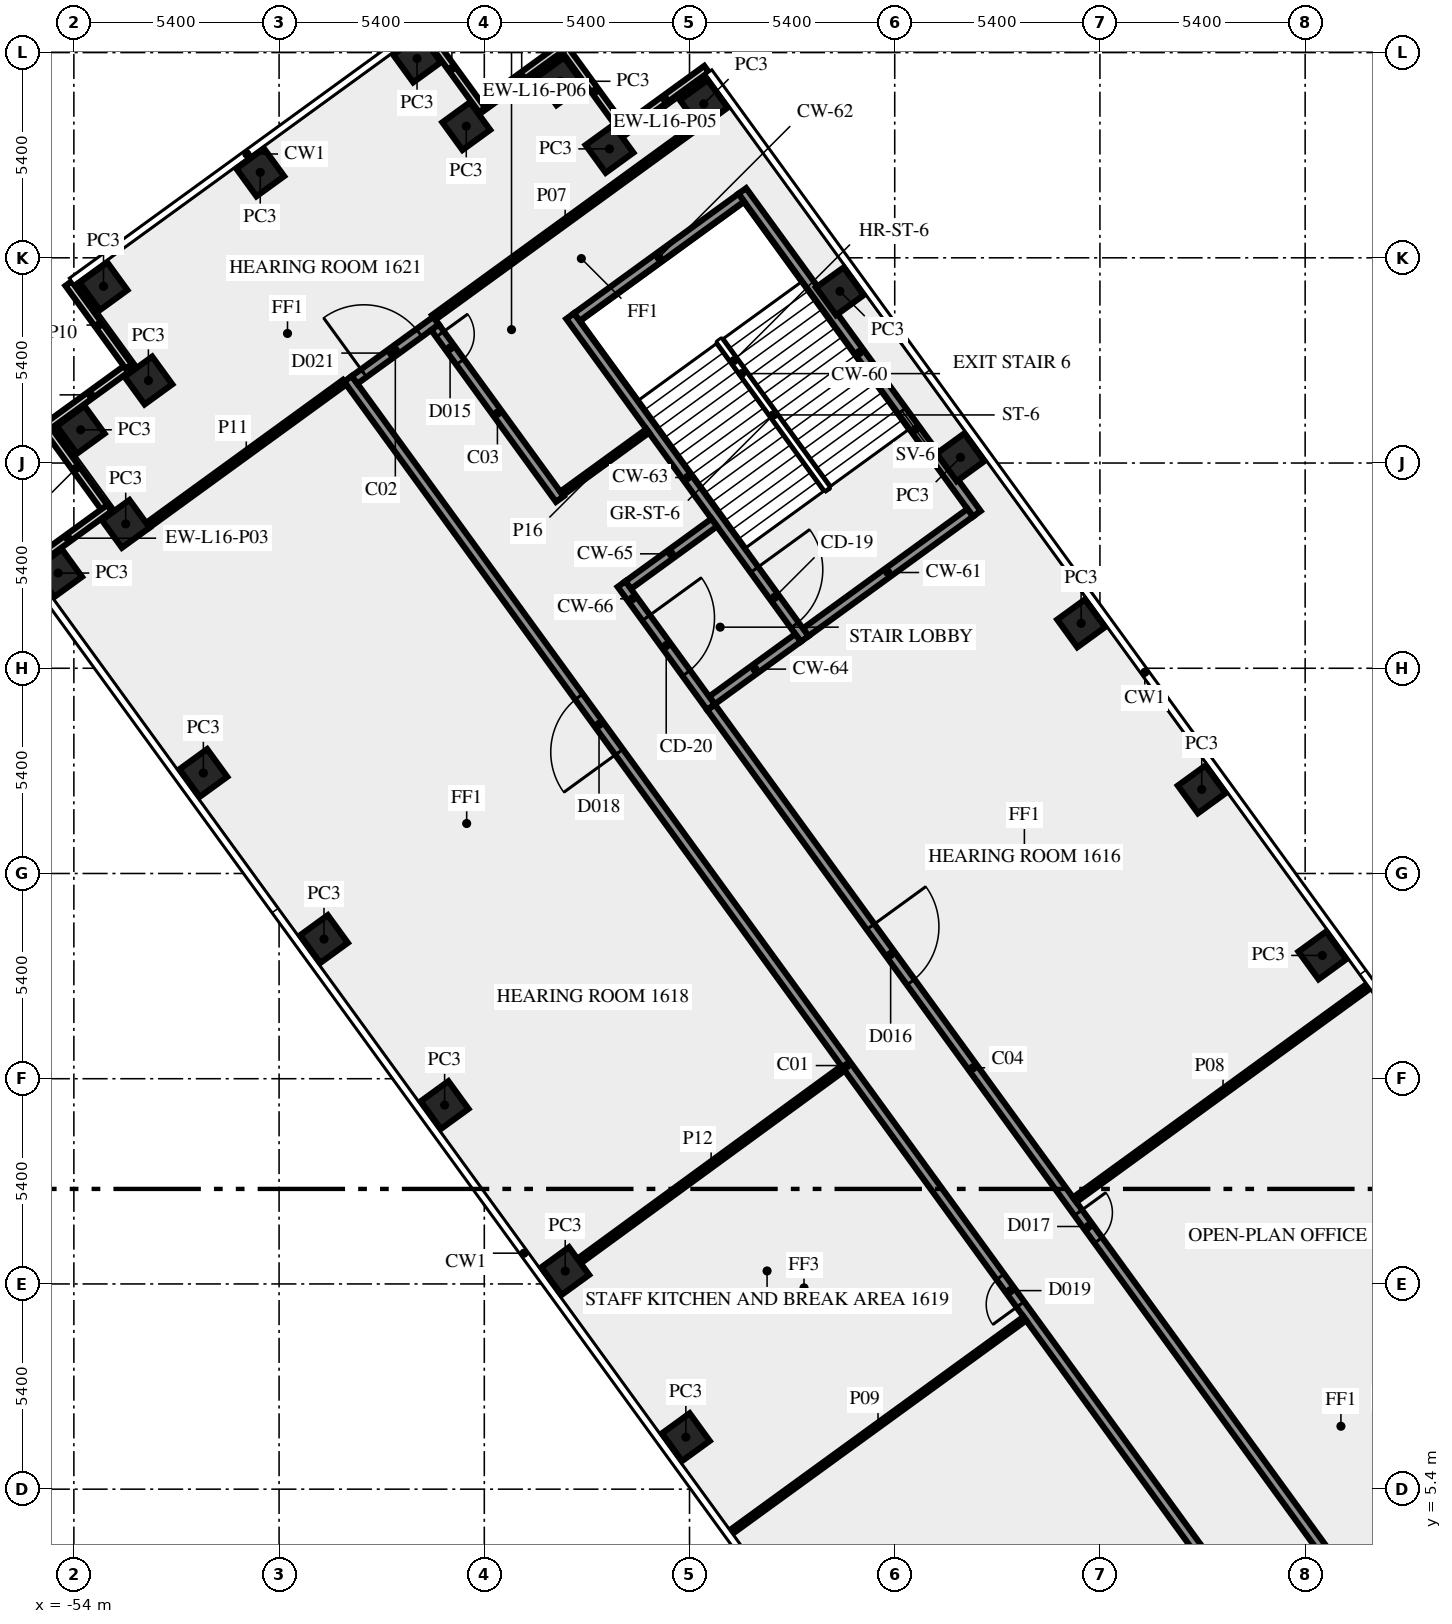
"""IFC4 building model, lengths in metres.
Left out: names, types, materials, properties, quantities, classifications, styles, units other than length and angle.
Written with IfcOpenShell. Run it as: python <this file> out.ifc"""

import sys

from ifc_helpers import new_model, si_unit, direction, frame, frame_2d, origin, origin_2d, place, context, subcontext, project, spatial, rectangle, extrude, element, fill, save


model = new_model("IFC4")
c1 = context("Model", 3, precision=1e-05, world=origin(), true_north=direction((0.0, 1.0)))
c2 = subcontext(c1, "Body", "Model", "MODEL_VIEW")
j1 = project(units=[si_unit("LENGTHUNIT", "METRE"), si_unit("PLANEANGLEUNIT", "RADIAN")], contexts=[c1])
p1 = place(None, origin())
s1 = spatial("IfcSite", under=j1, at=p1, CompositionType="ELEMENT")
p2 = place(p1, origin())
s2 = spatial("IfcBuilding", under=s1, at=p2, CompositionType="ELEMENT")
p3 = place(p2, frame((0.0, 0.0, 71.0)))
s3 = spatial("IfcBuildingStorey", under=s2, at=p3, CompositionType="ELEMENT", Elevation=71.0)
for number, where, z_axis, x_axis in (
    (1, (-21.147, 19.444, 0.0), (0.0, 0.0, 1.0), (-0.588, 0.809, 0.0)),
    (2, (-24.321, 23.812, 0.0), (0.0, 0.0, 1.0), (-0.588, 0.809, 0.0)),
    (3, (-27.495, 28.181, 0.0), (0.0, 0.0, 1.0), (-0.588, 0.809, 0.0)),
    (4, (-30.669, 32.55, 0.0), (0.0, 0.0, 1.0), (-0.588, 0.809, 0.0)),
    (5, (-33.843, 36.919, 0.0), (0.0, 0.0, 1.0), (-0.588, 0.809, 0.0)),
    (6, (-37.425, 41.85, 0.0), (0.0, 0.0, 1.0), (-0.588, 0.809, 0.0)),
    (7, (-39.906, 40.666, 0.0), (0.0, 0.0, 1.0), (-0.588, 0.809, 0.0)),
    (8, (-41.2, 42.445, 0.0), (0.0, 0.0, 1.0), (-0.588, 0.809, 0.0)),
    (9, (-43.675, 41.265, 0.0), (0.0, 0.0, 1.0), (-0.809, -0.588, 0.0)),
    (10, (-44.97, 43.045, 0.0), (0.0, 0.0, 1.0), (-0.809, -0.588, 0.0)),
    (11, (-49.096, 40.047, 0.0), (0.0, 0.0, 1.0), (-0.809, -0.588, 0.0)),
    (12, (-53.22, 37.05, 0.0), (0.0, 0.0, 1.0), (0.588, -0.809, 0.0)),
    (13, (-52.039, 34.571, 0.0), (0.0, 0.0, 1.0), (-0.809, -0.588, 0.0)),
    (14, (-53.82, 33.275, 0.0), (0.0, 0.0, 1.0), (0.588, -0.809, 0.0)),
    (15, (-52.636, 30.8, 0.0), (0.0, 0.0, 1.0), (-0.809, -0.588, 0.0)),
    (16, (-54.415, 29.505, 0.0), (0.0, 0.0, 1.0), (0.588, -0.809, 0.0)),
    (17, (-50.592, 24.243, 0.0), (0.0, 0.0, 1.0), (0.588, -0.809, 0.0)),
    (18, (-47.418, 19.875, 0.0), (0.0, 0.0, 1.0), (0.588, -0.809, 0.0)),
    (19, (-44.244, 15.506, 0.0), (0.0, 0.0, 1.0), (0.588, -0.809, 0.0)),
    (20, (-41.07, 11.137, 0.0), (0.0, 0.0, 1.0), (0.588, -0.809, 0.0)),
    (21, (-37.896, 6.769, 0.0), (0.0, 0.0, 1.0), (0.588, -0.809, 0.0)),
):
    element("IfcColumn", number, at=place(p3, frame(where, z_axis=z_axis, x_axis=x_axis)), inside=s3, PredefinedType="COLUMN", context=c2, shape_type="SweptSolid", body=[
        extrude(rectangle(XDim=0.9, YDim=0.9, at=origin_2d()), origin(), (0.0, 0.0, 1.0), 3.65),
    ])
p4 = place(p3, frame((-52.465, 34.987, 0.0), z_axis=(0.0, 0.0, 1.0), x_axis=(-0.809033161865, -0.587762999008, 0.0)))
e22 = element("IfcWall", 22, at=p4, inside=s3, PredefinedType="SOLIDWALL", context=c2, shape_type="SweptSolid", body=[
    extrude(rectangle(XDim=2.7, YDim=0.2, at=frame_2d((1.35, 0.0))), origin(), (0.0, 0.0, 1.0), 3.65),
])
p5 = place(p3, frame((-54.738, 33.351, 0.0), z_axis=(0.0, 0.0, 1.0), x_axis=(0.587779184282, -0.809021403008, 0.0)))
e23 = element("IfcWall", 23, at=p5, inside=s3, PredefinedType="SOLIDWALL", context=c2, shape_type="SweptSolid", body=[
    extrude(rectangle(XDim=2.7, YDim=0.2, at=frame_2d((1.35, 0.0))), origin(), (0.0, 0.0, 1.0), 3.65),
])
for number, where, z_axis, x_axis in (
    (24, (-53.063, 31.216, 0.0), (0.0, 0.0, 1.0), (-0.809, -0.588, 0.0)),
    (25, (-37.353, 42.768, 0.0), (0.0, 0.0, 1.0), (-0.809, -0.588, 0.0)),
):
    element("IfcWall", number, at=place(p3, frame(where, z_axis=z_axis, x_axis=x_axis)), inside=s3, PredefinedType="SOLIDWALL", context=c2, shape_type="SweptSolid", body=[
        extrude(rectangle(XDim=2.7, YDim=0.2, at=frame_2d((1.35, 0.0))), origin(), (0.0, 0.0, 1.0), 3.65),
    ])
p6 = place(p3, frame((-39.488, 41.094, 0.0), z_axis=(0.0, 0.0, 1.0), x_axis=(-0.587806000234, 0.809001919707, 0.0)))
e26 = element("IfcWall", 26, at=p6, inside=s3, PredefinedType="SOLIDWALL", context=c2, shape_type="SweptSolid", body=[
    extrude(rectangle(XDim=2.7, YDim=0.2, at=frame_2d((1.35, 0.0))), origin(), (0.0, 0.0, 1.0), 3.65),
])
for number, where, z_axis, x_axis in (
    (27, (-41.124, 43.366, 0.0), (0.0, 0.0, 1.0), (-0.809, -0.588, 0.0)),
    (28, (-43.259, 41.691, 0.0), (0.0, 0.0, 1.0), (-0.588, 0.809, 0.0)),
    (29, (-54.14, 37.123, 0.0), (0.0, 0.0, 1.0), (0.588, -0.809, 0.0)),
):
    element("IfcWall", number, at=place(p3, frame(where, z_axis=z_axis, x_axis=x_axis)), inside=s3, PredefinedType="SOLIDWALL", context=c2, shape_type="SweptSolid", body=[
        extrude(rectangle(XDim=2.7, YDim=0.2, at=frame_2d((1.35, 0.0))), origin(), (0.0, 0.0, 1.0), 3.65),
    ])
p7 = place(p3, frame((-30.24, 31.064, 0.0), z_axis=(0.0, 0.0, 1.0), x_axis=(-0.587795589702, 0.809009483706, 0.0)))
e30 = element("IfcWall", 30, at=p7, inside=s3, PredefinedType="SHEAR", context=c2, shape_type="SweptSolid", body=[
    extrude(rectangle(XDim=10.5, YDim=0.25, at=frame_2d((5.25, 0.0))), origin(), (0.0, 0.0, 1.0), 3.65),
])
p8 = place(p7, frame((2.15, 0.0, 1.0)))
e31 = element("IfcOpeningElement", 31, at=p8, cuts=e30, PredefinedType="OPENING", context=c2, shape_type="SweptSolid", body=[
    extrude(rectangle(XDim=1.2, YDim=1.2, at=frame_2d((0.6, 0.6))), frame((0.0, 0.135, 0.0), z_axis=(0.0, -1.0, 0.0), x_axis=(1.0, 0.0, 0.0)), (0.0, 0.0, 1.0), 0.27),
])
p9 = place(p3, frame((-30.414, 31.092, 0.0), z_axis=(0.0, 0.0, 1.0), x_axis=(-0.8089984606, -0.587810760999, 0.0)))
e32 = element("IfcWall", 32, at=p9, inside=s3, PredefinedType="SHEAR", context=c2, shape_type="SweptSolid", body=[
    extrude(rectangle(XDim=5.35, YDim=0.25, at=frame_2d((2.675, 0.0))), origin(), (0.0, 0.0, 1.0), 3.65),
])
p10 = place(p3, frame((-36.439, 39.384, 0.0), z_axis=(0.0, 0.0, 1.0), x_axis=(-0.809020161303, -0.587780893365, 0.0)))
e33 = element("IfcWall", 33, at=p10, inside=s3, PredefinedType="SHEAR", context=c2, shape_type="SweptSolid", body=[
    extrude(rectangle(XDim=5.35, YDim=0.25, at=frame_2d((2.675, 0.0))), origin(), (0.0, 0.0, 1.0), 3.65),
])
p11 = place(p3, frame((-40.942, 36.267, 0.0), z_axis=(0.0, 0.0, 1.0), x_axis=(0.587795589702, -0.809009483706, 0.0)))
e34 = element("IfcWall", 34, at=p11, inside=s3, PredefinedType="SHEAR", context=c2, shape_type="SweptSolid", body=[
    extrude(rectangle(XDim=10.5, YDim=0.25, at=frame_2d((5.25, 0.0))), origin(), (0.0, 0.0, 1.0), 3.65),
])
p12 = place(p11, frame((8.25, 0.0, 0.0)))
e35 = element("IfcOpeningElement", 35, at=p12, cuts=e34, PredefinedType="OPENING", context=c2, shape_type="SweptSolid", body=[
    extrude(rectangle(XDim=1.8, YDim=2.1, at=frame_2d((0.9, 1.05))), frame((0.0, 0.135, 0.0), z_axis=(0.0, -1.0, 0.0), x_axis=(1.0, 0.0, 0.0)), (0.0, 0.0, 1.0), 0.27),
])
for number, where, z_axis, x_axis in (
    (36, (-34.945, 27.8, 0.0), (0.0, 0.0, 1.0), (-0.809, -0.588, 0.0)),
    (37, (-37.149, 30.834, 0.0), (0.0, 0.0, 1.0), (-0.809, -0.588, 0.0)),
):
    element("IfcWall", number, at=place(p3, frame(where, z_axis=z_axis, x_axis=x_axis)), inside=s3, PredefinedType="SHEAR", context=c2, shape_type="SweptSolid", body=[
        extrude(rectangle(XDim=2.8, YDim=0.25, at=frame_2d((1.4, 0.0))), origin(), (0.0, 0.0, 1.0), 3.65),
    ])
p13 = place(p3, frame((-39.589, 29.216, 0.0), z_axis=(0.0, 0.0, 1.0), x_axis=(0.587772420479, -0.809026317077, 0.0)))
e38 = element("IfcWall", 38, at=p13, inside=s3, PredefinedType="SHEAR", context=c2, shape_type="SweptSolid", body=[
    extrude(rectangle(XDim=4.0, YDim=0.25, at=frame_2d((2.0, 0.0))), origin(), (0.0, 0.0, 1.0), 3.65),
])
p14 = place(p13, frame((1.1, 0.0, 0.0)))
e39 = element("IfcOpeningElement", 39, at=p14, cuts=e38, PredefinedType="OPENING", context=c2, shape_type="SweptSolid", body=[
    extrude(rectangle(XDim=1.8, YDim=2.1, at=frame_2d((0.9, 1.05))), frame((0.0, 0.135, 0.0), z_axis=(0.0, -1.0, 0.0), x_axis=(1.0, 0.0, 0.0)), (0.0, 0.0, 1.0), 0.27),
])
p15 = place(p3, frame((-20.531, -1.523, 0.0), z_axis=(0.0, 0.0, 1.0), x_axis=(-0.587784593204, 0.809017473231, 0.0)))
e40 = element("IfcWall", 40, at=p15, inside=s3, PredefinedType="SOLIDWALL", context=c2, shape_type="SweptSolid", body=[
    extrude(rectangle(XDim=44.67, YDim=0.25, at=frame_2d((22.335, 0.0))), origin(), (0.0, 0.0, 1.0), 3.65),
])
p16 = place(p15, frame((0.533, 0.0, 0.0)))
e41 = element("IfcOpeningElement", 41, at=p16, cuts=e40, PredefinedType="OPENING", context=c2, shape_type="SweptSolid", body=[
    extrude(rectangle(XDim=0.9, YDim=2.1, at=frame_2d((0.45, 1.05))), frame((0.0, 0.135, 0.0), z_axis=(0.0, -1.0, 0.0), x_axis=(1.0, 0.0, 0.0)), (0.0, 0.0, 1.0), 0.27),
])
p17 = place(p15, frame((32.531, 0.0, 0.0)))
e42 = element("IfcOpeningElement", 42, at=p17, cuts=e40, PredefinedType="OPENING", context=c2, shape_type="SweptSolid", body=[
    extrude(rectangle(XDim=1.8, YDim=2.1, at=frame_2d((0.9, 1.05))), frame((0.0, 0.135, 0.0), z_axis=(0.0, -1.0, 0.0), x_axis=(1.0, 0.0, 0.0)), (0.0, 0.0, 1.0), 0.27),
])
p18 = place(p15, frame((14.566, 0.0, 0.0)))
e43 = element("IfcOpeningElement", 43, at=p18, cuts=e40, PredefinedType="OPENING", context=c2, shape_type="SweptSolid", body=[
    extrude(rectangle(XDim=0.9, YDim=2.1, at=frame_2d((0.45, 1.05))), frame((0.0, 0.135, 0.0), z_axis=(0.0, -1.0, 0.0), x_axis=(1.0, 0.0, 0.0)), (0.0, 0.0, 1.0), 0.27),
])
p19 = place(p3, frame((-46.613, 34.588, 0.0), z_axis=(0.0, 0.0, 1.0), x_axis=(0.808994936898, 0.587815610607, 0.0)))
e44 = element("IfcWall", 44, at=p19, inside=s3, PredefinedType="SOLIDWALL", context=c2, shape_type="SweptSolid", body=[
    extrude(rectangle(XDim=2.65, YDim=0.25, at=frame_2d((1.325, 0.0))), origin(), (0.0, 0.0, 1.0), 3.65),
])
p20 = place(p19, frame((0.299, 0.0, 0.0)))
e45 = element("IfcOpeningElement", 45, at=p20, cuts=e44, PredefinedType="OPENING", context=c2, shape_type="SweptSolid", body=[
    extrude(rectangle(XDim=1.8, YDim=2.1, at=frame_2d((0.9, 1.05))), frame((0.0, 0.135, 0.0), z_axis=(0.0, -1.0, 0.0), x_axis=(1.0, 0.0, 0.0)), (0.0, 0.0, 1.0), 0.27),
])
p21 = place(p3, frame((-44.497, 35.971, 0.0), z_axis=(0.0, 0.0, 1.0), x_axis=(0.587742866856, -0.809047787501, 0.0)))
e46 = element("IfcWall", 46, at=p21, inside=s3, PredefinedType="SOLIDWALL", context=c2, shape_type="SweptSolid", body=[
    extrude(rectangle(XDim=5.586, YDim=0.25, at=frame_2d((2.793, 0.0))), origin(), (0.0, 0.0, 1.0), 3.65),
])
p22 = place(p21, frame((0.224, 0.0, 0.0)))
e47 = element("IfcOpeningElement", 47, at=p22, cuts=e46, PredefinedType="OPENING", context=c2, shape_type="SweptSolid", body=[
    extrude(rectangle(XDim=0.9, YDim=2.1, at=frame_2d((0.45, 1.05))), frame((0.0, 0.135, 0.0), z_axis=(0.0, -1.0, 0.0), x_axis=(1.0, 0.0, 0.0)), (0.0, 0.0, 1.0), 0.27),
])
p23 = place(p3, frame((-37.232, 25.972, 0.0), z_axis=(0.0, 0.0, 1.0), x_axis=(0.587786323093, -0.809016216391, 0.0)))
e48 = element("IfcWall", 48, at=p23, inside=s3, PredefinedType="SOLIDWALL", context=c2, shape_type="SweptSolid", body=[
    extrude(rectangle(XDim=33.493, YDim=0.25, at=frame_2d((16.747, 0.0))), origin(), (0.0, 0.0, 1.0), 3.65),
])
p24 = place(p23, frame((16.435, 0.0, 0.0)))
e49 = element("IfcOpeningElement", 49, at=p24, cuts=e48, PredefinedType="OPENING", context=c2, shape_type="SweptSolid", body=[
    extrude(rectangle(XDim=0.9, YDim=2.1, at=frame_2d((0.45, 1.05))), frame((0.0, 0.135, 0.0), z_axis=(0.0, -1.0, 0.0), x_axis=(1.0, 0.0, 0.0)), (0.0, 0.0, 1.0), 0.27),
])
p25 = place(p23, frame((7.137, 0.0, 0.0)))
e50 = element("IfcOpeningElement", 50, at=p25, cuts=e48, PredefinedType="OPENING", context=c2, shape_type="SweptSolid", body=[
    extrude(rectangle(XDim=1.8, YDim=2.1, at=frame_2d((0.9, 1.05))), frame((0.0, 0.135, 0.0), z_axis=(0.0, -1.0, 0.0), x_axis=(1.0, 0.0, 0.0)), (0.0, 0.0, 1.0), 0.27),
])
p26 = place(p3, frame((-37.614, 41.257, 0.0), z_axis=(0.0, 0.0, 1.0), x_axis=(-0.808991595707, -0.587820208972, 0.0)))
e51 = element("IfcWall", 51, at=p26, inside=s3, PredefinedType="PARTITIONING", context=c2, shape_type="SweptSolid", body=[
    extrude(rectangle(XDim=8.551, YDim=0.15, at=frame_2d((4.275, 0.0))), origin(), (0.0, 0.0, 1.0), 3.65),
])
p27 = place(p3, frame((-19.857, 18.689, 0.0), z_axis=(0.0, 0.0, 1.0), x_axis=(-0.809002920164, -0.587804623294, 0.0)))
e52 = element("IfcWall", 52, at=p27, inside=s3, PredefinedType="PARTITIONING", context=c2, shape_type="SweptSolid", body=[
    extrude(rectangle(XDim=9.651, YDim=0.15, at=frame_2d((4.825, 0.0))), origin(), (0.0, 0.0, 1.0), 2.75),
])
p28 = place(p3, frame((-28.976, 9.888, 0.0), z_axis=(0.0, 0.0, 1.0), x_axis=(-0.808998008689, -0.58781138296, 0.0)))
e53 = element("IfcWall", 53, at=p28, inside=s3, PredefinedType="PARTITIONING", context=c2, shape_type="SweptSolid", body=[
    extrude(rectangle(XDim=9.55, YDim=0.12, at=frame_2d((4.775, 0.0))), origin(), (0.0, 0.0, 1.0), 2.75),
])
p29 = place(p3, frame((-46.877, 34.526, 0.0), z_axis=(0.0, 0.0, 1.0), x_axis=(-0.808993566199, -0.587817497059, 0.0)))
e54 = element("IfcWall", 54, at=p29, inside=s3, PredefinedType="PARTITIONING", context=c2, shape_type="SweptSolid", body=[
    extrude(rectangle(XDim=6.395, YDim=0.15, at=frame_2d((3.197, 0.0))), origin(), (0.0, 0.0, 1.0), 3.65),
])
p30 = place(p3, frame((-40.702, 11.405, 0.0), z_axis=(0.0, 0.0, 1.0), x_axis=(0.807600812808, 0.58972953729, 0.0)))
e55 = element("IfcWall", 55, at=p30, inside=s3, PredefinedType="PARTITIONING", context=c2, shape_type="SweptSolid", body=[
    extrude(rectangle(XDim=8.595, YDim=0.15, at=frame_2d((4.297, 0.0))), origin(), (0.0, 0.0, 1.0), 3.65),
])
p31 = place(p3, frame((-41.166, 31.599, 0.0), z_axis=(0.0, 0.0, 1.0), x_axis=(0.809090262332, 0.587684394381, 0.0)))
e56 = element("IfcWall", 56, at=p31, inside=s3, PredefinedType="PARTITIONING", context=c2, shape_type="SweptSolid", body=[
    extrude(rectangle(XDim=2.801, YDim=0.12, at=frame_2d((1.4, 0.0))), origin(), (0.0, 0.0, 1.0), 3.65),
])
p32 = place(p8, origin())
e57 = element("IfcWindow", 57, at=p32, inside=s3, PartitioningType="SINGLE_PANEL", PredefinedType="WINDOW", context=c2, shape_type="SweptSolid", body=[
    extrude(rectangle(XDim=1.2, YDim=1.2, at=frame_2d((0.6, 0.6))), frame((0.0, 0.03, 0.0), z_axis=(0.0, -1.0, 0.0), x_axis=(1.0, 0.0, 0.0)), (0.0, 0.0, 1.0), 0.06),
])
fill(e31, e57)
p33 = place(p12, origin())
e58 = element("IfcDoor", 58, at=p33, inside=s3, OperationType="DOUBLE_DOOR_SINGLE_SWING", PredefinedType="DOOR", context=c2, shape_type="SweptSolid", body=[
    extrude(rectangle(XDim=1.8, YDim=2.1, at=frame_2d((0.9, 1.05))), frame((0.0, 0.025, 0.0), z_axis=(0.0, -1.0, 0.0), x_axis=(1.0, 0.0, 0.0)), (0.0, 0.0, 1.0), 0.05),
])
fill(e35, e58)
p34 = place(p14, origin())
e59 = element("IfcDoor", 59, at=p34, inside=s3, OperationType="DOUBLE_DOOR_SINGLE_SWING", PredefinedType="DOOR", context=c2, shape_type="SweptSolid", body=[
    extrude(rectangle(XDim=1.8, YDim=2.1, at=frame_2d((0.9, 1.05))), frame((0.0, 0.025, 0.0), z_axis=(0.0, -1.0, 0.0), x_axis=(1.0, 0.0, 0.0)), (0.0, 0.0, 1.0), 0.05),
])
fill(e39, e59)
p35 = place(p22, origin())
e60 = element("IfcDoor", 60, at=p35, inside=s3, OperationType="SINGLE_SWING_LEFT", PredefinedType="DOOR", context=c2, shape_type="SweptSolid", body=[
    extrude(rectangle(XDim=0.9, YDim=2.1, at=frame_2d((0.45, 1.05))), frame((0.0, 0.025, 0.0), z_axis=(0.0, -1.0, 0.0), x_axis=(1.0, 0.0, 0.0)), (0.0, 0.0, 1.0), 0.05),
])
fill(e47, e60)
p36 = place(p24, origin())
e61 = element("IfcDoor", 61, at=p36, inside=s3, OperationType="SINGLE_SWING_LEFT", PredefinedType="DOOR", context=c2, shape_type="SweptSolid", body=[
    extrude(rectangle(XDim=0.9, YDim=2.1, at=frame_2d((0.45, 1.05))), frame((0.0, 0.025, 0.0), z_axis=(0.0, -1.0, 0.0), x_axis=(1.0, 0.0, 0.0)), (0.0, 0.0, 1.0), 0.05),
])
fill(e49, e61)
p37 = place(p25, origin())
e62 = element("IfcDoor", 62, at=p37, inside=s3, OperationType="DOUBLE_DOOR_SINGLE_SWING", PredefinedType="DOOR", context=c2, shape_type="SweptSolid", body=[
    extrude(rectangle(XDim=1.8, YDim=2.1, at=frame_2d((0.9, 1.05))), frame((0.0, 0.025, 0.0), z_axis=(0.0, -1.0, 0.0), x_axis=(1.0, 0.0, 0.0)), (0.0, 0.0, 1.0), 0.05),
])
fill(e50, e62)
p38 = place(p17, origin())
e63 = element("IfcDoor", 63, at=p38, inside=s3, OperationType="DOUBLE_DOOR_SINGLE_SWING", PredefinedType="DOOR", context=c2, shape_type="SweptSolid", body=[
    extrude(rectangle(XDim=1.8, YDim=2.1, at=frame_2d((0.9, 1.05))), frame((0.0, 0.025, 0.0), z_axis=(0.0, -1.0, 0.0), x_axis=(1.0, 0.0, 0.0)), (0.0, 0.0, 1.0), 0.05),
])
fill(e42, e63)
p39 = place(p20, origin())
e64 = element("IfcDoor", 64, at=p39, inside=s3, OperationType="DOUBLE_DOOR_SINGLE_SWING", PredefinedType="DOOR", context=c2, shape_type="SweptSolid", body=[
    extrude(rectangle(XDim=1.8, YDim=2.1, at=frame_2d((0.9, 1.05))), frame((0.0, 0.025, 0.0), z_axis=(0.0, -1.0, 0.0), x_axis=(1.0, 0.0, 0.0)), (0.0, 0.0, 1.0), 0.05),
])
fill(e45, e64)
p40 = place(p18, origin())
e65 = element("IfcDoor", 65, at=p40, inside=s3, OperationType="SINGLE_SWING_LEFT", PredefinedType="DOOR", context=c2, shape_type="SweptSolid", body=[
    extrude(rectangle(XDim=0.9, YDim=2.1, at=frame_2d((0.45, 1.05))), frame((0.0, 0.025, 0.0), z_axis=(0.0, -1.0, 0.0), x_axis=(1.0, 0.0, 0.0)), (0.0, 0.0, 1.0), 0.05),
])
fill(e43, e65)
save(model, sys.argv[1])
